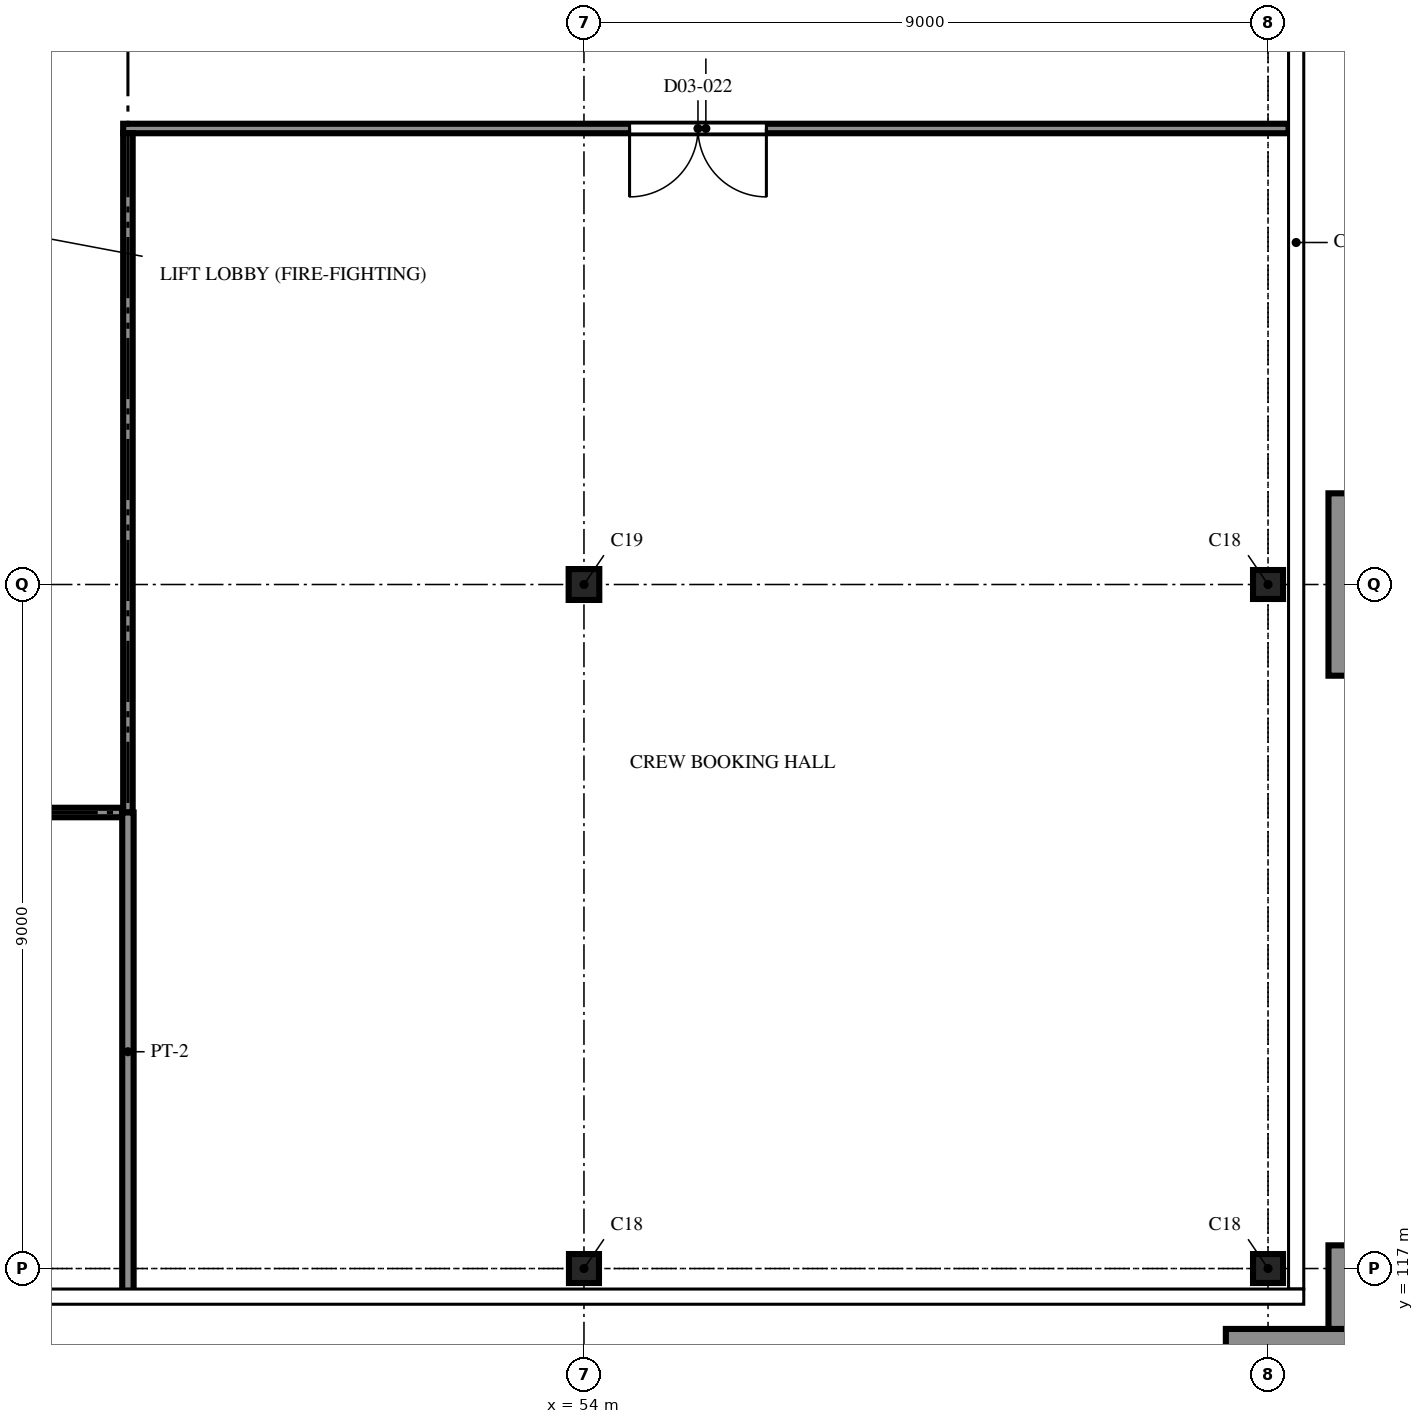
"""IFC4 building model, lengths in metres.
Left out: names, types, materials, properties, quantities, classifications, styles, units other than length and angle.
Written with IfcOpenShell. Run it as: python <this file> out.ifc"""

import sys

from ifc_helpers import new_model, si_unit, direction, frame, frame_2d, origin, origin_2d, place, context, subcontext, project, spatial, polyline, rectangle, i_section, outline, extrude, element, fill, save


model = new_model("IFC4")
c1 = context("Model", 3, precision=1e-05, world=origin(), true_north=direction((0.0, 1.0)))
c2 = subcontext(c1, "Body", "Model", "MODEL_VIEW")
j1 = project(units=[si_unit("LENGTHUNIT", "METRE"), si_unit("PLANEANGLEUNIT", "RADIAN")], contexts=[c1])
p1 = place(None, origin())
s1 = spatial("IfcSite", under=j1, at=p1, CompositionType="ELEMENT")
p2 = place(p1, origin())
s2 = spatial("IfcBuilding", under=s1, at=p2, CompositionType="ELEMENT")
p3 = place(p2, frame((0.0, 0.0, 15.9)))
s3 = spatial("IfcBuildingStorey", under=s2, at=p3, CompositionType="ELEMENT", Elevation=15.9)
p4 = place(p3, frame((54.0, 117.0, 0.0), z_axis=(0.0, 0.0, 1.0), x_axis=(1.0, 0.0, 0.0)))
e1 = element("IfcColumn", 1, at=p4, inside=s3, PredefinedType="COLUMN", context=c2, shape_type="SweptSolid", body=[
    extrude(i_section(OverallWidth=0.395, OverallDepth=0.381, WebThickness=0.018, FlangeThickness=0.03, FilletRadius=0.015, at=origin_2d()), origin(), (0.0, 0.0, 1.0), 4.2),
])
p5 = place(p3, frame((54.0, 126.0, 0.0), z_axis=(0.0, 0.0, 1.0), x_axis=(1.0, 0.0, 0.0)))
e2 = element("IfcColumn", 2, at=p5, inside=s3, PredefinedType="COLUMN", context=c2, shape_type="SweptSolid", body=[
    extrude(i_section(OverallWidth=0.403, OverallDepth=0.406, WebThickness=0.027, FlangeThickness=0.043, FilletRadius=0.015, at=origin_2d()), origin(), (0.0, 0.0, 1.0), 4.2),
])
for number, where, z_axis, x_axis in (
    (3, (63.0, 117.0, 0.0), (0.0, 0.0, 1.0), (1.0, 0.0, 0.0)),
    (4, (63.0, 126.0, 0.0), (0.0, 0.0, 1.0), (1.0, 0.0, 0.0)),
):
    element("IfcColumn", number, at=place(p3, frame(where, z_axis=z_axis, x_axis=x_axis)), inside=s3, PredefinedType="COLUMN", context=c2, shape_type="SweptSolid", body=[
        extrude(i_section(OverallWidth=0.395, OverallDepth=0.381, WebThickness=0.018, FlangeThickness=0.03, FilletRadius=0.015, at=origin_2d()), origin(), (0.0, 0.0, 1.0), 4.2),
    ])
p6 = place(p3, frame((64.62, 124.8, 0.0), z_axis=(0.0, 0.0, 1.0), x_axis=(0.0, 1.0, 0.0)))
e5 = element("IfcWall", 5, at=p6, inside=s3, PredefinedType="SOLIDWALL", context=c2, shape_type="SweptSolid", body=[
    extrude(rectangle(XDim=2.4, YDim=1.65, at=frame_2d((1.2, 0.0))), origin(), (0.0, 0.0, 1.0), 4.2),
])
p7 = place(p3, frame((62.445, 115.38, 0.0), z_axis=(0.0, 0.0, 1.0), x_axis=(1.0, 0.0, 0.0)))
e6 = element("IfcWall", 6, at=p7, inside=s3, PredefinedType="SOLIDWALL", context=c2, shape_type="SweptSolid", body=[
    extrude(rectangle(XDim=3.0, YDim=1.65, at=frame_2d((1.5, 0.0))), origin(), (0.0, 0.0, 1.0), 4.2),
])
p8 = place(p3, frame((64.62, 116.205, 0.0), z_axis=(0.0, 0.0, 1.0), x_axis=(0.0, 1.0, 0.0)))
e7 = element("IfcWall", 7, at=p8, inside=s3, PredefinedType="SOLIDWALL", context=c2, shape_type="SweptSolid", body=[
    extrude(rectangle(XDim=1.1, YDim=1.65, at=frame_2d((0.55, 0.0))), origin(), (0.0, 0.0, 1.0), 4.2),
])
p9 = place(p3, frame((63.27, 132.0, 0.0), z_axis=(0.0, 0.0, 1.0), x_axis=(-1.0, 0.0, 0.0)))
e8 = element("IfcWall", 8, at=p9, inside=s3, PredefinedType="PARTITIONING", context=c2, shape_type="SweptSolid", body=[
    extrude(rectangle(XDim=15.333, YDim=0.125, at=frame_2d((7.666, 0.0))), origin(), (0.0, 0.0, 1.0), 3.287),
])
p10 = place(p9, frame((6.87, 0.0, 0.0)))
e9 = element("IfcOpeningElement", 9, at=p10, cuts=e8, PredefinedType="OPENING", context=c2, shape_type="SweptSolid", body=[
    extrude(rectangle(XDim=1.8, YDim=2.4, at=frame_2d((0.9, 1.2))), frame((0.0, 0.073, 0.0), z_axis=(0.0, -1.0, 0.0), x_axis=(1.0, 0.0, 0.0)), (0.0, 0.0, 1.0), 0.145),
])
p11 = place(p3, frame((48.0, 131.938, 0.0), z_axis=(0.0, 0.0, 1.0), x_axis=(0.0, -1.0, 0.0)))
e10 = element("IfcWall", 10, at=p11, inside=s3, PredefinedType="PARTITIONING", context=c2, shape_type="SweptSolid", body=[
    extrude(rectangle(XDim=8.938, YDim=0.125, at=frame_2d((4.469, 0.0))), origin(), (0.0, 0.0, 1.0), 3.287),
])
p12 = place(p3, frame((47.925, 123.0, 0.0), z_axis=(0.0, 0.0, 1.0), x_axis=(-1.0, 0.0, 0.0)))
e11 = element("IfcWall", 11, at=p12, inside=s3, PredefinedType="PARTITIONING", context=c2, shape_type="SweptSolid", body=[
    extrude(rectangle(XDim=23.85, YDim=0.125, at=frame_2d((11.925, 0.0))), origin(), (0.0, 0.0, 1.0), 3.287),
])
p13 = place(p12, frame((11.425, 0.0, 0.0)))
e12 = element("IfcOpeningElement", 12, at=p13, cuts=e11, PredefinedType="OPENING", context=c2, shape_type="SweptSolid", body=[
    extrude(rectangle(XDim=1.0, YDim=2.1, at=frame_2d((0.5, 1.05))), frame((0.0, 0.073, 0.0), z_axis=(0.0, -1.0, 0.0), x_axis=(1.0, 0.0, 0.0)), (0.0, 0.0, 1.0), 0.145),
])
p14 = place(p3, frame((48.0, 116.705, 0.0), z_axis=(0.0, 0.0, 1.0), x_axis=(0.0, 1.0, 0.0)))
e13 = element("IfcWall", 13, at=p14, inside=s3, PredefinedType="PARTITIONING", context=c2, shape_type="SweptSolid", body=[
    extrude(rectangle(XDim=6.295, YDim=0.15, at=frame_2d((3.147, 0.0))), origin(), (0.0, 0.0, 1.0), 3.307),
])
p15 = place(p10, origin())
e14 = element("IfcDoor", 14, at=p15, inside=s3, OperationType="DOUBLE_DOOR_SINGLE_SWING", PredefinedType="DOOR", context=c2, shape_type="SweptSolid", body=[
    extrude(outline(polyline([(0.0, 0.0), (0.07, 0.0), (0.07, 2.33), (1.73, 2.33), (1.73, 0.0), (1.8, 0.0), (1.8, 2.4), (0.0, 2.4), (0.0, 0.0)])), frame((0.0, 0.025, 0.0), z_axis=(0.0, -1.0, 0.0), x_axis=(1.0, 0.0, 0.0)), (0.0, 0.0, 1.0), 0.05),
    extrude(outline(polyline([(0.074, 0.01), (0.897, 0.01), (0.897, 2.326), (0.074, 2.326), (0.074, 0.01)]), holes=[polyline([(0.194, 0.16), (0.777, 0.16), (0.777, 1.01), (0.194, 1.01), (0.194, 0.16)]), polyline([(0.335, 1.16), (0.635, 1.16), (0.635, 1.76), (0.335, 1.76), (0.335, 1.16)])]), frame((0.0, 0.017, 0.0), z_axis=(0.0, -1.0, 0.0), x_axis=(1.0, 0.0, 0.0)), (0.0, 0.0, 1.0), 0.035),
    extrude(rectangle(XDim=0.583, YDim=0.85, at=frame_2d((0.485, 0.585))), frame((0.0, 0.009, 0.0), z_axis=(0.0, -1.0, 0.0), x_axis=(1.0, 0.0, 0.0)), (0.0, 0.0, 1.0), 0.017),
    extrude(rectangle(XDim=0.3, YDim=0.6, at=frame_2d((0.485, 1.46))), frame((0.0, 0.006, 0.0), z_axis=(0.0, -1.0, 0.0), x_axis=(1.0, 0.0, 0.0)), (0.0, 0.0, 1.0), 0.012),
    extrude(outline(polyline([(0.903, 0.01), (1.726, 0.01), (1.726, 2.326), (0.903, 2.326), (0.903, 0.01)]), holes=[polyline([(1.023, 0.16), (1.606, 0.16), (1.606, 1.01), (1.023, 1.01), (1.023, 0.16)]), polyline([(1.165, 1.16), (1.465, 1.16), (1.465, 1.76), (1.165, 1.76), (1.165, 1.16)])]), frame((0.0, 0.017, 0.0), z_axis=(0.0, -1.0, 0.0), x_axis=(1.0, 0.0, 0.0)), (0.0, 0.0, 1.0), 0.035),
    extrude(rectangle(XDim=0.583, YDim=0.85, at=frame_2d((1.314, 0.585))), frame((0.0, 0.009, 0.0), z_axis=(0.0, -1.0, 0.0), x_axis=(1.0, 0.0, 0.0)), (0.0, 0.0, 1.0), 0.017),
    extrude(rectangle(XDim=0.3, YDim=0.6, at=frame_2d((1.314, 1.46))), frame((0.0, 0.006, 0.0), z_axis=(0.0, -1.0, 0.0), x_axis=(1.0, 0.0, 0.0)), (0.0, 0.0, 1.0), 0.012),
])
fill(e9, e14)
save(model, sys.argv[1])
